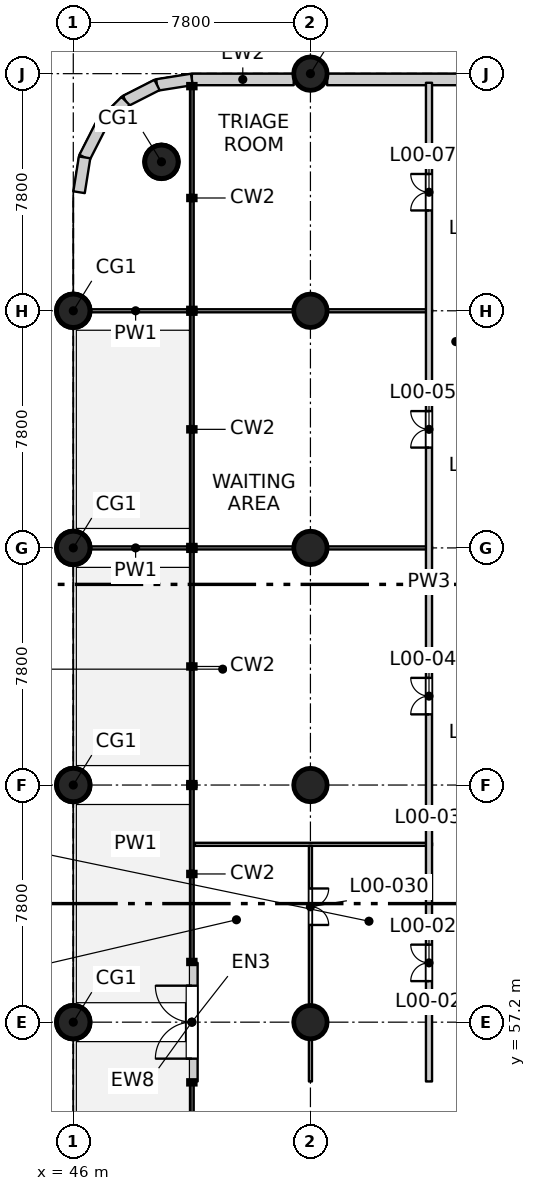
"""IFC4 building model, lengths in metres.
Left out: names, types, materials, properties, quantities, classifications, styles, units other than length and angle.
Written with IfcOpenShell. Run it as: python <this file> out.ifc"""

import sys

from ifc_helpers import new_model, si_unit, direction, frame, frame_2d, origin, origin_2d, place, context, subcontext, project, spatial, rectangle, circle, extrude, element, fill, save


model = new_model("IFC4")
c1 = context("Model", 3, precision=1e-05, world=origin(), true_north=direction((0.0, 1.0)))
c2 = subcontext(c1, "Body", "Model", "MODEL_VIEW")
j1 = project(units=[si_unit("LENGTHUNIT", "METRE"), si_unit("PLANEANGLEUNIT", "RADIAN")], contexts=[c1])
p1 = place(None, origin())
s1 = spatial("IfcSite", under=j1, at=p1, CompositionType="ELEMENT")
p2 = place(p1, origin())
s2 = spatial("IfcBuilding", under=s1, at=p2, CompositionType="ELEMENT")
p3 = place(p2, origin())
s3 = spatial("IfcBuildingStorey", under=s2, at=p3, CompositionType="ELEMENT", Elevation=0.0)
for number, where, z_axis, x_axis in (
    (1, (46.0, 57.2, -0.4), (0.0, 0.0, 1.0), (1.0, 0.0, 0.0)),
    (2, (46.0, 65.0, -0.4), (0.0, 0.0, 1.0), (1.0, 0.0, 0.0)),
    (3, (46.0, 72.8, -0.4), (0.0, 0.0, 1.0), (1.0, 0.0, 0.0)),
    (4, (46.0, 80.6, -0.4), (0.0, 0.0, 1.0), (1.0, 0.0, 0.0)),
    (5, (48.9, 85.5, -0.4), (0.0, 0.0, 1.0), (1.0, 0.0, 0.0)),
    (6, (53.8, 57.2, -0.4), (0.0, 0.0, 1.0), (1.0, 0.0, 0.0)),
    (7, (53.8, 65.0, -0.4), (0.0, 0.0, 1.0), (1.0, 0.0, 0.0)),
    (8, (53.8, 72.8, -0.4), (0.0, 0.0, 1.0), (1.0, 0.0, 0.0)),
    (9, (53.8, 80.6, -0.4), (0.0, 0.0, 1.0), (1.0, 0.0, 0.0)),
    (10, (53.8, 88.4, -0.4), (0.0, 0.0, 1.0), (1.0, 0.0, 0.0)),
):
    element("IfcColumn", number, at=place(p3, frame(where, z_axis=z_axis, x_axis=x_axis)), inside=s3, PredefinedType="COLUMN", context=c2, shape_type="SweptSolid", body=[
        extrude(circle(Radius=0.55, at=origin_2d()), origin(), (0.0, 0.0, 1.0), 6.1),
    ])
p4 = place(p3, frame((49.9, 55.25, 0.0), z_axis=(0.0, 0.0, 1.0), x_axis=(0.0, 1.0, 0.0)))
e11 = element("IfcWall", 11, at=p4, inside=s3, PredefinedType="SOLIDWALL", context=c2, shape_type="SweptSolid", body=[
    extrude(rectangle(XDim=3.9, YDim=0.38, at=frame_2d((1.95, 0.0))), origin(), (0.0, 0.0, 1.0), 5.7),
])
p5 = place(p4, frame((0.75, 0.0, 0.0)))
e12 = element("IfcOpeningElement", 12, at=p5, cuts=e11, PredefinedType="OPENING", context=c2, shape_type="SweptSolid", body=[
    extrude(rectangle(XDim=2.4, YDim=2.4, at=frame_2d((1.2, 1.2))), frame((0.0, 0.2, 0.0), z_axis=(0.0, -1.0, 0.0), x_axis=(1.0, 0.0, 0.0)), (0.0, 0.0, 1.0), 0.4),
])
p6 = place(p3, frame((49.9, 88.21, 0.0), z_axis=(0.0, 0.0, 1.0), x_axis=(1.0, 0.0, 0.0)))
e13 = element("IfcWall", 13, at=p6, inside=s3, PredefinedType="SOLIDWALL", context=c2, shape_type="SweptSolid", body=[
    extrude(rectangle(XDim=3.35, YDim=0.38, at=frame_2d((1.675, 0.0))), origin(), (0.0, 0.0, 1.0), 5.7),
])
p7 = place(p3, frame((54.35, 88.21, 0.0), z_axis=(0.0, 0.0, 1.0), x_axis=(1.0, 0.0, 0.0)))
e14 = element("IfcWall", 14, at=p7, inside=s3, PredefinedType="SOLIDWALL", context=c2, shape_type="SweptSolid", body=[
    extrude(rectangle(XDim=14.45, YDim=0.38, at=frame_2d((7.225, 0.0))), origin(), (0.0, 0.0, 1.0), 5.7),
])
p8 = place(p3, frame((49.9, 88.21, 0.0), z_axis=(0.0, 0.0, 1.0), x_axis=(-0.987675821844, -0.156513484867, 0.0)))
e15 = element("IfcWall", 15, at=p8, inside=s3, PredefinedType="SOLIDWALL", context=c2, shape_type="SweptSolid", body=[
    extrude(rectangle(XDim=1.161, YDim=0.38, at=frame_2d((0.58, 0.0))), origin(), (0.0, 0.0, 1.0), 5.7),
])
for number, where, z_axis, x_axis in (
    (16, (48.754, 88.028, 0.0), (0.0, 0.0, 1.0), (-0.891, -0.454, 0.0)),
    (17, (47.719, 87.501, 0.0), (0.0, 0.0, 1.0), (-0.707, -0.707, 0.0)),
):
    element("IfcWall", number, at=place(p3, frame(where, z_axis=z_axis, x_axis=x_axis)), inside=s3, PredefinedType="SOLIDWALL", context=c2, shape_type="SweptSolid", body=[
        extrude(rectangle(XDim=1.161, YDim=0.38, at=frame_2d((0.581, 0.0))), origin(), (0.0, 0.0, 1.0), 5.7),
    ])
p9 = place(p3, frame((46.898, 86.681, 0.0), z_axis=(0.0, 0.0, 1.0), x_axis=(-0.453932083539, -0.891036286317, 0.0)))
e18 = element("IfcWall", 18, at=p9, inside=s3, PredefinedType="SOLIDWALL", context=c2, shape_type="SweptSolid", body=[
    extrude(rectangle(XDim=1.161, YDim=0.38, at=frame_2d((0.58, 0.0))), origin(), (0.0, 0.0, 1.0), 5.7),
])
p10 = place(p3, frame((46.372, 85.646, 0.0), z_axis=(0.0, 0.0, 1.0), x_axis=(-0.156480971952, -0.987680973502, 0.0)))
e19 = element("IfcWall", 19, at=p10, inside=s3, PredefinedType="SOLIDWALL", context=c2, shape_type="SweptSolid", body=[
    extrude(rectangle(XDim=1.161, YDim=0.38, at=frame_2d((0.581, 0.0))), origin(), (0.0, 0.0, 1.0), 5.7),
])
p11 = place(p3, frame((46.3, 63.05, 0.0), z_axis=(0.0, 0.0, 1.0), x_axis=(1.0, 0.0, 0.0)))
e20 = element("IfcWall", 20, at=p11, inside=s3, PredefinedType="PARTITIONING", context=c2, shape_type="SweptSolid", body=[
    extrude(rectangle(XDim=3.5, YDim=0.1, at=frame_2d((1.75, 0.0))), origin(), (0.0, 0.0, 1.0), 5.7),
])
p12 = place(p3, frame((50.0, 63.05, 0.0), z_axis=(0.0, 0.0, 1.0), x_axis=(1.0, 0.0, 0.0)))
e21 = element("IfcWall", 21, at=p12, inside=s3, PredefinedType="PARTITIONING", context=c2, shape_type="SweptSolid", body=[
    extrude(rectangle(XDim=7.8, YDim=0.1, at=frame_2d((3.9, 0.0))), origin(), (0.0, 0.0, 1.0), 5.7),
])
p13 = place(p3, frame((46.3, 72.8, 0.0), z_axis=(0.0, 0.0, 1.0), x_axis=(1.0, 0.0, 0.0)))
e22 = element("IfcWall", 22, at=p13, inside=s3, PredefinedType="PARTITIONING", context=c2, shape_type="SweptSolid", body=[
    extrude(rectangle(XDim=3.5, YDim=0.1, at=frame_2d((1.75, 0.0))), origin(), (0.0, 0.0, 1.0), 5.7),
])
p14 = place(p3, frame((50.0, 72.8, 0.0), z_axis=(0.0, 0.0, 1.0), x_axis=(1.0, 0.0, 0.0)))
e23 = element("IfcWall", 23, at=p14, inside=s3, PredefinedType="PARTITIONING", context=c2, shape_type="SweptSolid", body=[
    extrude(rectangle(XDim=7.8, YDim=0.1, at=frame_2d((3.9, 0.0))), origin(), (0.0, 0.0, 1.0), 5.7),
])
p15 = place(p3, frame((46.3, 80.6, 0.0), z_axis=(0.0, 0.0, 1.0), x_axis=(1.0, 0.0, 0.0)))
e24 = element("IfcWall", 24, at=p15, inside=s3, PredefinedType="PARTITIONING", context=c2, shape_type="SweptSolid", body=[
    extrude(rectangle(XDim=3.5, YDim=0.1, at=frame_2d((1.75, 0.0))), origin(), (0.0, 0.0, 1.0), 5.7),
])
p16 = place(p3, frame((50.0, 80.6, 0.0), z_axis=(0.0, 0.0, 1.0), x_axis=(1.0, 0.0, 0.0)))
e25 = element("IfcWall", 25, at=p16, inside=s3, PredefinedType="PARTITIONING", context=c2, shape_type="SweptSolid", body=[
    extrude(rectangle(XDim=7.8, YDim=0.1, at=frame_2d((3.9, 0.0))), origin(), (0.0, 0.0, 1.0), 5.7),
])
p17 = place(p3, frame((53.8, 55.25, 0.0), z_axis=(0.0, 0.0, 1.0), x_axis=(0.0, 1.0, 0.0)))
e26 = element("IfcWall", 26, at=p17, inside=s3, PredefinedType="PARTITIONING", context=c2, shape_type="SweptSolid", body=[
    extrude(rectangle(XDim=7.75, YDim=0.1, at=frame_2d((3.875, 0.0))), origin(), (0.0, 0.0, 1.0), 5.7),
])
p18 = place(p17, frame((5.147, 0.0, 0.0)))
e27 = element("IfcOpeningElement", 27, at=p18, cuts=e26, PredefinedType="OPENING", context=c2, shape_type="SweptSolid", body=[
    extrude(rectangle(XDim=1.2, YDim=2.1, at=frame_2d((0.6, 1.05))), frame((0.0, 0.06, 0.0), z_axis=(0.0, -1.0, 0.0), x_axis=(1.0, 0.0, 0.0)), (0.0, 0.0, 1.0), 0.12),
])
p19 = place(p3, frame((57.7, 55.25, 0.0), z_axis=(0.0, 0.0, 1.0), x_axis=(0.0, 1.0, 0.0)))
e28 = element("IfcWall", 28, at=p19, inside=s3, PredefinedType="PARTITIONING", context=c2, shape_type="SweptSolid", body=[
    extrude(rectangle(XDim=32.85, YDim=0.2, at=frame_2d((16.425, 0.0))), origin(), (0.0, 0.0, 1.0), 5.7),
])
p20 = place(p19, frame((3.3, 0.0, 0.0)))
e29 = element("IfcOpeningElement", 29, at=p20, cuts=e28, PredefinedType="OPENING", context=c2, shape_type="SweptSolid", body=[
    extrude(rectangle(XDim=1.2, YDim=2.1, at=frame_2d((0.6, 1.05))), frame((0.0, 0.11, 0.0), z_axis=(0.0, -1.0, 0.0), x_axis=(1.0, 0.0, 0.0)), (0.0, 0.0, 1.0), 0.22),
])
p21 = place(p19, frame((12.075, 0.0, 0.0)))
e30 = element("IfcOpeningElement", 30, at=p21, cuts=e28, PredefinedType="OPENING", context=c2, shape_type="SweptSolid", body=[
    extrude(rectangle(XDim=1.2, YDim=2.1, at=frame_2d((0.6, 1.05))), frame((0.0, 0.11, 0.0), z_axis=(0.0, -1.0, 0.0), x_axis=(1.0, 0.0, 0.0)), (0.0, 0.0, 1.0), 0.22),
])
p22 = place(p19, frame((20.85, 0.0, 0.0)))
e31 = element("IfcOpeningElement", 31, at=p22, cuts=e28, PredefinedType="OPENING", context=c2, shape_type="SweptSolid", body=[
    extrude(rectangle(XDim=1.2, YDim=2.1, at=frame_2d((0.6, 1.05))), frame((0.0, 0.11, 0.0), z_axis=(0.0, -1.0, 0.0), x_axis=(1.0, 0.0, 0.0)), (0.0, 0.0, 1.0), 0.22),
])
p23 = place(p19, frame((28.65, 0.0, 0.0)))
e32 = element("IfcOpeningElement", 32, at=p23, cuts=e28, PredefinedType="OPENING", context=c2, shape_type="SweptSolid", body=[
    extrude(rectangle(XDim=1.2, YDim=2.1, at=frame_2d((0.6, 1.05))), frame((0.0, 0.11, 0.0), z_axis=(0.0, -1.0, 0.0), x_axis=(1.0, 0.0, 0.0)), (0.0, 0.0, 1.0), 0.22),
])
p24 = place(p5, origin())
e33 = element("IfcDoor", 33, at=p24, inside=s3, OperationType="DOUBLE_DOOR_SINGLE_SWING", PredefinedType="DOOR", context=c2, shape_type="SweptSolid", body=[
    extrude(rectangle(XDim=2.4, YDim=2.4, at=frame_2d((1.2, 1.2))), frame((0.0, 0.025, 0.0), z_axis=(0.0, -1.0, 0.0), x_axis=(1.0, 0.0, 0.0)), (0.0, 0.0, 1.0), 0.05),
])
fill(e12, e33)
p25 = place(p20, origin())
e34 = element("IfcDoor", 34, at=p25, inside=s3, OperationType="DOUBLE_DOOR_SINGLE_SWING", PredefinedType="DOOR", context=c2, shape_type="SweptSolid", body=[
    extrude(rectangle(XDim=1.2, YDim=2.1, at=frame_2d((0.6, 1.05))), frame((0.0, 0.025, 0.0), z_axis=(0.0, -1.0, 0.0), x_axis=(1.0, 0.0, 0.0)), (0.0, 0.0, 1.0), 0.05),
])
fill(e29, e34)
p26 = place(p18, origin())
e35 = element("IfcDoor", 35, at=p26, inside=s3, OperationType="DOUBLE_DOOR_SINGLE_SWING", PredefinedType="DOOR", context=c2, shape_type="SweptSolid", body=[
    extrude(rectangle(XDim=1.2, YDim=2.1, at=frame_2d((0.6, 1.05))), frame((0.0, 0.025, 0.0), z_axis=(0.0, -1.0, 0.0), x_axis=(1.0, 0.0, 0.0)), (0.0, 0.0, 1.0), 0.05),
])
fill(e27, e35)
p27 = place(p21, origin())
e36 = element("IfcDoor", 36, at=p27, inside=s3, OperationType="DOUBLE_DOOR_SINGLE_SWING", PredefinedType="DOOR", context=c2, shape_type="SweptSolid", body=[
    extrude(rectangle(XDim=1.2, YDim=2.1, at=frame_2d((0.6, 1.05))), frame((0.0, 0.025, 0.0), z_axis=(0.0, -1.0, 0.0), x_axis=(1.0, 0.0, 0.0)), (0.0, 0.0, 1.0), 0.05),
])
fill(e30, e36)
p28 = place(p22, origin())
e37 = element("IfcDoor", 37, at=p28, inside=s3, OperationType="DOUBLE_DOOR_SINGLE_SWING", PredefinedType="DOOR", context=c2, shape_type="SweptSolid", body=[
    extrude(rectangle(XDim=1.2, YDim=2.1, at=frame_2d((0.6, 1.05))), frame((0.0, 0.025, 0.0), z_axis=(0.0, -1.0, 0.0), x_axis=(1.0, 0.0, 0.0)), (0.0, 0.0, 1.0), 0.05),
])
fill(e31, e37)
p29 = place(p23, origin())
e38 = element("IfcDoor", 38, at=p29, inside=s3, OperationType="DOUBLE_DOOR_SINGLE_SWING", PredefinedType="DOOR", context=c2, shape_type="SweptSolid", body=[
    extrude(rectangle(XDim=1.2, YDim=2.1, at=frame_2d((0.6, 1.05))), frame((0.0, 0.025, 0.0), z_axis=(0.0, -1.0, 0.0), x_axis=(1.0, 0.0, 0.0)), (0.0, 0.0, 1.0), 0.05),
])
fill(e32, e38)
save(model, sys.argv[1])
